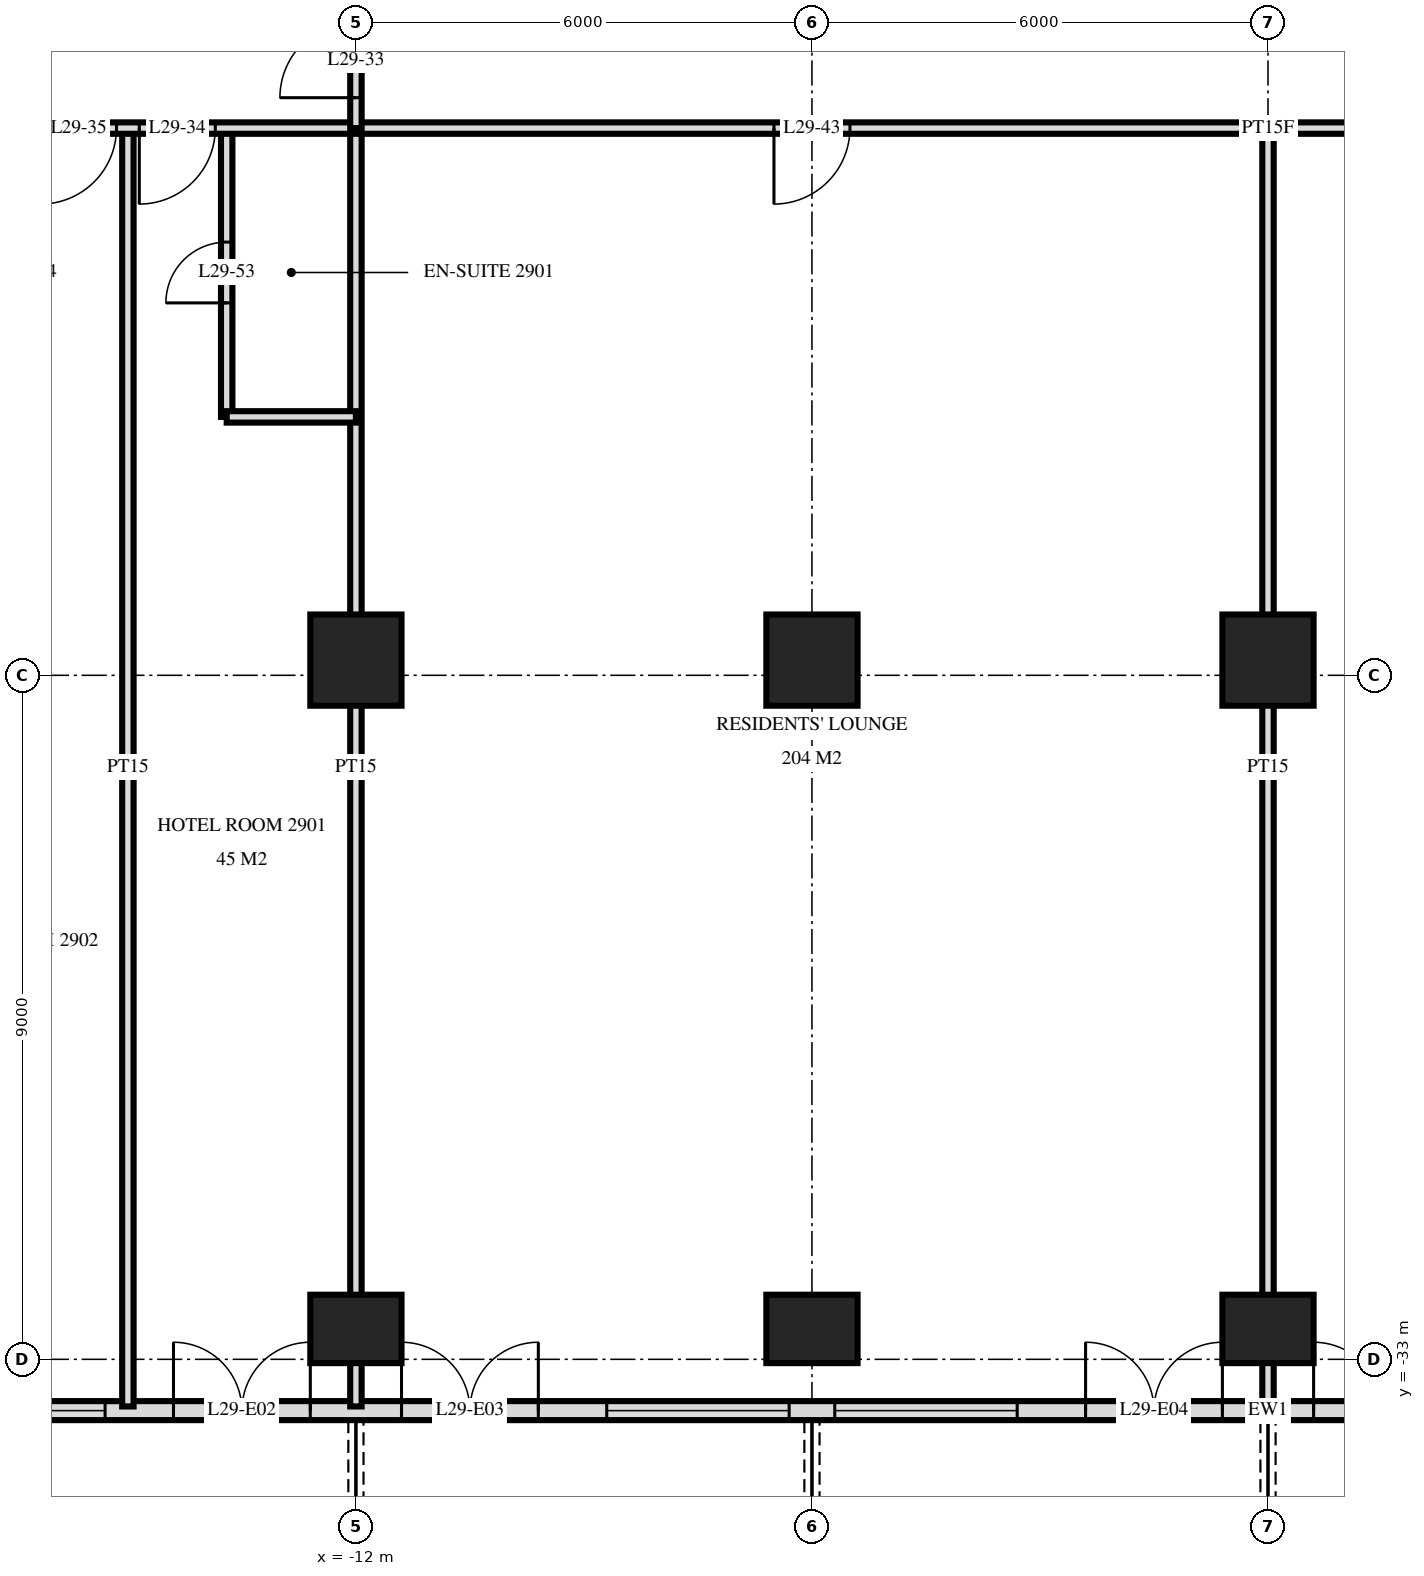
"""IFC4 building model, lengths in metres.
Left out: names, types, materials, properties, quantities, classifications, styles, units other than length and angle.
Written with IfcOpenShell. Run it as: python <this file> out.ifc"""

import sys

from ifc_helpers import new_model, si_unit, direction, frame, frame_2d, origin, origin_2d, place, context, subcontext, project, spatial, rectangle, extrude, element, fill, save


model = new_model("IFC4")
c1 = context("Model", 3, precision=1e-05, world=origin(), true_north=direction((0.0, 1.0)))
c2 = subcontext(c1, "Body", "Model", "MODEL_VIEW")
j1 = project(units=[si_unit("LENGTHUNIT", "METRE"), si_unit("PLANEANGLEUNIT", "RADIAN")], contexts=[c1])
p1 = place(None, origin())
s1 = spatial("IfcSite", under=j1, at=p1, CompositionType="ELEMENT")
p2 = place(p1, origin())
s2 = spatial("IfcBuilding", under=s1, at=p2, CompositionType="ELEMENT")
p3 = place(p2, frame((0.0, 0.0, 116.4)))
s3 = spatial("IfcBuildingStorey", under=s2, at=p3, CompositionType="ELEMENT", Elevation=116.4)
p4 = place(p3, frame((-12.0, -32.6, 0.0), z_axis=(0.0, 0.0, 1.0), x_axis=(1.0, 0.0, 0.0)))
e1 = element("IfcColumn", 1, at=p4, inside=s3, PredefinedType="COLUMN", context=c2, shape_type="SweptSolid", body=[
    extrude(rectangle(XDim=1.2, YDim=0.9, at=origin_2d()), origin(), (0.0, 0.0, 1.0), 3.6),
])
p5 = place(p3, frame((-12.0, -23.8, 0.0), z_axis=(0.0, 0.0, 1.0), x_axis=(1.0, 0.0, 0.0)))
e2 = element("IfcColumn", 2, at=p5, inside=s3, PredefinedType="COLUMN", context=c2, shape_type="SweptSolid", body=[
    extrude(rectangle(XDim=1.2, YDim=1.2, at=origin_2d()), origin(), (0.0, 0.0, 1.0), 3.6),
])
p6 = place(p3, frame((-6.0, -32.6, 0.0), z_axis=(0.0, 0.0, 1.0), x_axis=(1.0, 0.0, 0.0)))
e3 = element("IfcColumn", 3, at=p6, inside=s3, PredefinedType="COLUMN", context=c2, shape_type="SweptSolid", body=[
    extrude(rectangle(XDim=1.2, YDim=0.9, at=origin_2d()), origin(), (0.0, 0.0, 1.0), 3.6),
])
p7 = place(p3, frame((-6.0, -23.8, 0.0), z_axis=(0.0, 0.0, 1.0), x_axis=(1.0, 0.0, 0.0)))
e4 = element("IfcColumn", 4, at=p7, inside=s3, PredefinedType="COLUMN", context=c2, shape_type="SweptSolid", body=[
    extrude(rectangle(XDim=1.2, YDim=1.2, at=origin_2d()), origin(), (0.0, 0.0, 1.0), 3.6),
])
p8 = place(p3, frame((0.0, -32.6, 0.0), z_axis=(0.0, 0.0, 1.0), x_axis=(1.0, 0.0, 0.0)))
e5 = element("IfcColumn", 5, at=p8, inside=s3, PredefinedType="COLUMN", context=c2, shape_type="SweptSolid", body=[
    extrude(rectangle(XDim=1.2, YDim=0.9, at=origin_2d()), origin(), (0.0, 0.0, 1.0), 3.6),
])
p9 = place(p3, frame((0.0, -23.8, 0.0), z_axis=(0.0, 0.0, 1.0), x_axis=(1.0, 0.0, 0.0)))
e6 = element("IfcColumn", 6, at=p9, inside=s3, PredefinedType="COLUMN", context=c2, shape_type="SweptSolid", body=[
    extrude(rectangle(XDim=1.2, YDim=1.2, at=origin_2d()), origin(), (0.0, 0.0, 1.0), 3.6),
])
p10 = place(p3, frame((-23.675, -33.675, 0.0), z_axis=(0.0, 0.0, 1.0), x_axis=(1.0, 0.0, 0.0)))
e7 = element("IfcWall", 7, at=p10, inside=s3, PredefinedType="SOLIDWALL", context=c2, shape_type="SweptSolid", body=[
    extrude(rectangle(XDim=47.351, YDim=0.25, at=frame_2d((23.675, 0.0))), origin(), (0.0, 0.0, 1.0), 3.32),
])
p11 = place(p10, frame((0.275, 0.0, 0.3)))
e8 = element("IfcOpeningElement", 8, at=p11, cuts=e7, PredefinedType="OPENING", context=c2, shape_type="SweptSolid", body=[
    extrude(rectangle(XDim=2.4, YDim=2.1, at=frame_2d((1.2, 1.05))), frame((0.0, 0.135, 0.0), z_axis=(0.0, -1.0, 0.0), x_axis=(1.0, 0.0, 0.0)), (0.0, 0.0, 1.0), 0.27),
])
p12 = place(p10, frame((3.425, 0.0, 0.0)))
e9 = element("IfcOpeningElement", 9, at=p12, cuts=e7, PredefinedType="OPENING", context=c2, shape_type="SweptSolid", body=[
    extrude(rectangle(XDim=1.8, YDim=2.4, at=frame_2d((0.9, 1.2))), frame((0.0, 0.135, 0.0), z_axis=(0.0, -1.0, 0.0), x_axis=(1.0, 0.0, 0.0)), (0.0, 0.0, 1.0), 0.27),
])
p13 = place(p10, frame((5.975, 0.0, 0.3)))
e10 = element("IfcOpeningElement", 10, at=p13, cuts=e7, PredefinedType="OPENING", context=c2, shape_type="SweptSolid", body=[
    extrude(rectangle(XDim=2.4, YDim=2.1, at=frame_2d((1.2, 1.05))), frame((0.0, 0.135, 0.0), z_axis=(0.0, -1.0, 0.0), x_axis=(1.0, 0.0, 0.0)), (0.0, 0.0, 1.0), 0.27),
])
p14 = place(p10, frame((9.275, 0.0, 0.0)))
e11 = element("IfcOpeningElement", 11, at=p14, cuts=e7, PredefinedType="OPENING", context=c2, shape_type="SweptSolid", body=[
    extrude(rectangle(XDim=1.8, YDim=2.4, at=frame_2d((0.9, 1.2))), frame((0.0, 0.135, 0.0), z_axis=(0.0, -1.0, 0.0), x_axis=(1.0, 0.0, 0.0)), (0.0, 0.0, 1.0), 0.27),
])
p15 = place(p10, frame((12.275, 0.0, 0.0)))
e12 = element("IfcOpeningElement", 12, at=p15, cuts=e7, PredefinedType="OPENING", context=c2, shape_type="SweptSolid", body=[
    extrude(rectangle(XDim=1.8, YDim=2.4, at=frame_2d((0.9, 1.2))), frame((0.0, 0.135, 0.0), z_axis=(0.0, -1.0, 0.0), x_axis=(1.0, 0.0, 0.0)), (0.0, 0.0, 1.0), 0.27),
])
p16 = place(p10, frame((14.975, 0.0, 0.3)))
e13 = element("IfcOpeningElement", 13, at=p16, cuts=e7, PredefinedType="OPENING", context=c2, shape_type="SweptSolid", body=[
    extrude(rectangle(XDim=2.4, YDim=2.1, at=frame_2d((1.2, 1.05))), frame((0.0, 0.135, 0.0), z_axis=(0.0, -1.0, 0.0), x_axis=(1.0, 0.0, 0.0)), (0.0, 0.0, 1.0), 0.27),
])
p17 = place(p10, frame((17.975, 0.0, 0.3)))
e14 = element("IfcOpeningElement", 14, at=p17, cuts=e7, PredefinedType="OPENING", context=c2, shape_type="SweptSolid", body=[
    extrude(rectangle(XDim=2.4, YDim=2.1, at=frame_2d((1.2, 1.05))), frame((0.0, 0.135, 0.0), z_axis=(0.0, -1.0, 0.0), x_axis=(1.0, 0.0, 0.0)), (0.0, 0.0, 1.0), 0.27),
])
p18 = place(p10, frame((21.275, 0.0, 0.0)))
e15 = element("IfcOpeningElement", 15, at=p18, cuts=e7, PredefinedType="OPENING", context=c2, shape_type="SweptSolid", body=[
    extrude(rectangle(XDim=1.8, YDim=2.4, at=frame_2d((0.9, 1.2))), frame((0.0, 0.135, 0.0), z_axis=(0.0, -1.0, 0.0), x_axis=(1.0, 0.0, 0.0)), (0.0, 0.0, 1.0), 0.27),
])
p19 = place(p10, frame((24.275, 0.0, 0.0)))
e16 = element("IfcOpeningElement", 16, at=p19, cuts=e7, PredefinedType="OPENING", context=c2, shape_type="SweptSolid", body=[
    extrude(rectangle(XDim=1.8, YDim=2.4, at=frame_2d((0.9, 1.2))), frame((0.0, 0.135, 0.0), z_axis=(0.0, -1.0, 0.0), x_axis=(1.0, 0.0, 0.0)), (0.0, 0.0, 1.0), 0.27),
])
p20 = place(p10, frame((26.975, 0.0, 0.3)))
e17 = element("IfcOpeningElement", 17, at=p20, cuts=e7, PredefinedType="OPENING", context=c2, shape_type="SweptSolid", body=[
    extrude(rectangle(XDim=2.4, YDim=2.1, at=frame_2d((1.2, 1.05))), frame((0.0, 0.135, 0.0), z_axis=(0.0, -1.0, 0.0), x_axis=(1.0, 0.0, 0.0)), (0.0, 0.0, 1.0), 0.27),
])
p21 = place(p10, frame((30.275, 0.0, 0.0)))
e18 = element("IfcOpeningElement", 18, at=p21, cuts=e7, PredefinedType="OPENING", context=c2, shape_type="SweptSolid", body=[
    extrude(rectangle(XDim=1.8, YDim=2.4, at=frame_2d((0.9, 1.2))), frame((0.0, 0.135, 0.0), z_axis=(0.0, -1.0, 0.0), x_axis=(1.0, 0.0, 0.0)), (0.0, 0.0, 1.0), 0.27),
])
p22 = place(p10, frame((32.975, 0.0, 0.3)))
e19 = element("IfcOpeningElement", 19, at=p22, cuts=e7, PredefinedType="OPENING", context=c2, shape_type="SweptSolid", body=[
    extrude(rectangle(XDim=2.4, YDim=2.1, at=frame_2d((1.2, 1.05))), frame((0.0, 0.135, 0.0), z_axis=(0.0, -1.0, 0.0), x_axis=(1.0, 0.0, 0.0)), (0.0, 0.0, 1.0), 0.27),
])
p23 = place(p10, frame((35.975, 0.0, 0.3)))
e20 = element("IfcOpeningElement", 20, at=p23, cuts=e7, PredefinedType="OPENING", context=c2, shape_type="SweptSolid", body=[
    extrude(rectangle(XDim=2.4, YDim=2.1, at=frame_2d((1.2, 1.05))), frame((0.0, 0.135, 0.0), z_axis=(0.0, -1.0, 0.0), x_axis=(1.0, 0.0, 0.0)), (0.0, 0.0, 1.0), 0.27),
])
p24 = place(p10, frame((39.275, 0.0, 0.0)))
e21 = element("IfcOpeningElement", 21, at=p24, cuts=e7, PredefinedType="OPENING", context=c2, shape_type="SweptSolid", body=[
    extrude(rectangle(XDim=1.8, YDim=2.4, at=frame_2d((0.9, 1.2))), frame((0.0, 0.135, 0.0), z_axis=(0.0, -1.0, 0.0), x_axis=(1.0, 0.0, 0.0)), (0.0, 0.0, 1.0), 0.27),
])
p25 = place(p10, frame((41.975, 0.0, 0.3)))
e22 = element("IfcOpeningElement", 22, at=p25, cuts=e7, PredefinedType="OPENING", context=c2, shape_type="SweptSolid", body=[
    extrude(rectangle(XDim=2.4, YDim=2.1, at=frame_2d((1.2, 1.05))), frame((0.0, 0.135, 0.0), z_axis=(0.0, -1.0, 0.0), x_axis=(1.0, 0.0, 0.0)), (0.0, 0.0, 1.0), 0.27),
])
p26 = place(p10, frame((45.125, 0.0, 0.0)))
e23 = element("IfcOpeningElement", 23, at=p26, cuts=e7, PredefinedType="OPENING", context=c2, shape_type="SweptSolid", body=[
    extrude(rectangle(XDim=1.8, YDim=2.4, at=frame_2d((0.9, 1.2))), frame((0.0, 0.135, 0.0), z_axis=(0.0, -1.0, 0.0), x_axis=(1.0, 0.0, 0.0)), (0.0, 0.0, 1.0), 0.27),
])
p27 = place(p3, frame((0.0, -33.62, 0.0), z_axis=(0.0, 0.0, 1.0), x_axis=(0.0, 1.0, 0.0)))
e24 = element("IfcWall", 24, at=p27, inside=s3, PredefinedType="PARTITIONING", context=c2, shape_type="SweptSolid", body=[
    extrude(rectangle(XDim=16.82, YDim=0.15, at=frame_2d((8.41, 0.0))), origin(), (0.0, 0.0, 1.0), 3.32),
])
p28 = place(p3, frame((-12.0, -16.8, 0.0), z_axis=(0.0, 0.0, 1.0), x_axis=(0.0, 1.0, 0.0)))
e25 = element("IfcWall", 25, at=p28, inside=s3, PredefinedType="PARTITIONING", context=c2, shape_type="SweptSolid", body=[
    extrude(rectangle(XDim=1.75, YDim=0.15, at=frame_2d((0.875, 0.0))), origin(), (0.0, 0.0, 1.0), 3.32),
])
p29 = place(p28, frame((0.4, 0.0, 0.0)))
e26 = element("IfcOpeningElement", 26, at=p29, cuts=e25, PredefinedType="OPENING", context=c2, shape_type="SweptSolid", body=[
    extrude(rectangle(XDim=1.0, YDim=2.1, at=frame_2d((0.5, 1.05))), frame((0.0, 0.085, 0.0), z_axis=(0.0, -1.0, 0.0), x_axis=(1.0, 0.0, 0.0)), (0.0, 0.0, 1.0), 0.17),
])
p30 = place(p3, frame((-12.0, -33.62, 0.0), z_axis=(0.0, 0.0, 1.0), x_axis=(0.0, 1.0, 0.0)))
e27 = element("IfcWall", 27, at=p30, inside=s3, PredefinedType="PARTITIONING", context=c2, shape_type="SweptSolid", body=[
    extrude(rectangle(XDim=16.82, YDim=0.15, at=frame_2d((8.41, 0.0))), origin(), (0.0, 0.0, 1.0), 3.32),
])
p31 = place(p3, frame((-13.7, -20.6, 0.0), z_axis=(0.0, 0.0, 1.0), x_axis=(0.0, 1.0, 0.0)))
e28 = element("IfcWall", 28, at=p31, inside=s3, PredefinedType="PARTITIONING", context=c2, shape_type="SweptSolid", body=[
    extrude(rectangle(XDim=3.8, YDim=0.15, at=frame_2d((1.9, 0.0))), origin(), (0.0, 0.0, 1.0), 3.32),
])
p32 = place(p31, frame((1.5, 0.0, 0.0)))
e29 = element("IfcOpeningElement", 29, at=p32, cuts=e28, PredefinedType="OPENING", context=c2, shape_type="SweptSolid", body=[
    extrude(rectangle(XDim=0.8, YDim=2.1, at=frame_2d((0.4, 1.05))), frame((0.0, 0.085, 0.0), z_axis=(0.0, -1.0, 0.0), x_axis=(1.0, 0.0, 0.0)), (0.0, 0.0, 1.0), 0.17),
])
p33 = place(p3, frame((-15.0, -33.62, 0.0), z_axis=(0.0, 0.0, 1.0), x_axis=(0.0, 1.0, 0.0)))
e30 = element("IfcWall", 30, at=p33, inside=s3, PredefinedType="PARTITIONING", context=c2, shape_type="SweptSolid", body=[
    extrude(rectangle(XDim=16.82, YDim=0.15, at=frame_2d((8.41, 0.0))), origin(), (0.0, 0.0, 1.0), 3.32),
])
p34 = place(p3, frame((-13.7, -20.6, 0.0), z_axis=(0.0, 0.0, 1.0), x_axis=(1.0, 0.0, 0.0)))
e31 = element("IfcWall", 31, at=p34, inside=s3, PredefinedType="PARTITIONING", context=c2, shape_type="SweptSolid", body=[
    extrude(rectangle(XDim=1.7, YDim=0.15, at=frame_2d((0.85, 0.0))), origin(), (0.0, 0.0, 1.0), 3.32),
])
p35 = place(p3, frame((-28.02, -16.8, 0.0), z_axis=(0.0, 0.0, 1.0), x_axis=(1.0, 0.0, 0.0)))
e32 = element("IfcWall", 32, at=p35, inside=s3, PredefinedType="PARTITIONING", context=c2, shape_type="SweptSolid", body=[
    extrude(rectangle(XDim=56.04, YDim=0.15, at=frame_2d((28.02, 0.0))), origin(), (0.0, 0.0, 1.0), 3.32),
])
p36 = place(p35, frame((13.17, 0.0, 0.0)))
e33 = element("IfcOpeningElement", 33, at=p36, cuts=e32, PredefinedType="OPENING", context=c2, shape_type="SweptSolid", body=[
    extrude(rectangle(XDim=1.0, YDim=2.1, at=frame_2d((0.5, 1.05))), frame((0.0, 0.085, 0.0), z_axis=(0.0, -1.0, 0.0), x_axis=(1.0, 0.0, 0.0)), (0.0, 0.0, 1.0), 0.17),
])
p37 = place(p35, frame((11.87, 0.0, 0.0)))
e34 = element("IfcOpeningElement", 34, at=p37, cuts=e32, PredefinedType="OPENING", context=c2, shape_type="SweptSolid", body=[
    extrude(rectangle(XDim=1.0, YDim=2.1, at=frame_2d((0.5, 1.05))), frame((0.0, 0.085, 0.0), z_axis=(0.0, -1.0, 0.0), x_axis=(1.0, 0.0, 0.0)), (0.0, 0.0, 1.0), 0.17),
])
p38 = place(p35, frame((8.32, 0.0, 0.0)))
e35 = element("IfcOpeningElement", 35, at=p38, cuts=e32, PredefinedType="OPENING", context=c2, shape_type="SweptSolid", body=[
    extrude(rectangle(XDim=1.0, YDim=2.1, at=frame_2d((0.5, 1.05))), frame((0.0, 0.085, 0.0), z_axis=(0.0, -1.0, 0.0), x_axis=(1.0, 0.0, 0.0)), (0.0, 0.0, 1.0), 0.17),
])
p39 = place(p35, frame((40.42, 0.0, 0.0)))
e36 = element("IfcOpeningElement", 36, at=p39, cuts=e32, PredefinedType="OPENING", context=c2, shape_type="SweptSolid", body=[
    extrude(rectangle(XDim=1.0, YDim=2.1, at=frame_2d((0.5, 1.05))), frame((0.0, 0.085, 0.0), z_axis=(0.0, -1.0, 0.0), x_axis=(1.0, 0.0, 0.0)), (0.0, 0.0, 1.0), 0.17),
])
p40 = place(p35, frame((46.72, 0.0, 0.0)))
e37 = element("IfcOpeningElement", 37, at=p40, cuts=e32, PredefinedType="OPENING", context=c2, shape_type="SweptSolid", body=[
    extrude(rectangle(XDim=1.0, YDim=2.1, at=frame_2d((0.5, 1.05))), frame((0.0, 0.085, 0.0), z_axis=(0.0, -1.0, 0.0), x_axis=(1.0, 0.0, 0.0)), (0.0, 0.0, 1.0), 0.17),
])
p41 = place(p35, frame((21.52, 0.0, 0.0)))
e38 = element("IfcOpeningElement", 38, at=p41, cuts=e32, PredefinedType="OPENING", context=c2, shape_type="SweptSolid", body=[
    extrude(rectangle(XDim=1.0, YDim=2.1, at=frame_2d((0.5, 1.05))), frame((0.0, 0.085, 0.0), z_axis=(0.0, -1.0, 0.0), x_axis=(1.0, 0.0, 0.0)), (0.0, 0.0, 1.0), 0.17),
])
p42 = place(p35, frame((30.52, 0.0, 0.0)))
e39 = element("IfcOpeningElement", 39, at=p42, cuts=e32, PredefinedType="OPENING", context=c2, shape_type="SweptSolid", body=[
    extrude(rectangle(XDim=1.0, YDim=2.1, at=frame_2d((0.5, 1.05))), frame((0.0, 0.085, 0.0), z_axis=(0.0, -1.0, 0.0), x_axis=(1.0, 0.0, 0.0)), (0.0, 0.0, 1.0), 0.17),
])
p43 = place(p35, frame((36.52, 0.0, 0.0)))
e40 = element("IfcOpeningElement", 40, at=p43, cuts=e32, PredefinedType="OPENING", context=c2, shape_type="SweptSolid", body=[
    extrude(rectangle(XDim=1.0, YDim=2.1, at=frame_2d((0.5, 1.05))), frame((0.0, 0.085, 0.0), z_axis=(0.0, -1.0, 0.0), x_axis=(1.0, 0.0, 0.0)), (0.0, 0.0, 1.0), 0.17),
])
p44 = place(p13, origin())
e41 = element("IfcWindow", 41, at=p44, inside=s3, PartitioningType="SINGLE_PANEL", PredefinedType="WINDOW", context=c2, shape_type="SweptSolid", body=[
    extrude(rectangle(XDim=2.4, YDim=2.1, at=frame_2d((1.2, 1.05))), frame((0.0, 0.03, 0.0), z_axis=(0.0, -1.0, 0.0), x_axis=(1.0, 0.0, 0.0)), (0.0, 0.0, 1.0), 0.06),
])
fill(e10, e41)
p45 = place(p14, origin())
e42 = element("IfcDoor", 42, at=p45, inside=s3, OperationType="DOUBLE_DOOR_SINGLE_SWING", PredefinedType="DOOR", context=c2, shape_type="SweptSolid", body=[
    extrude(rectangle(XDim=1.8, YDim=2.4, at=frame_2d((0.9, 1.2))), frame((0.0, 0.025, 0.0), z_axis=(0.0, -1.0, 0.0), x_axis=(1.0, 0.0, 0.0)), (0.0, 0.0, 1.0), 0.05),
])
fill(e11, e42)
p46 = place(p15, origin())
e43 = element("IfcDoor", 43, at=p46, inside=s3, OperationType="DOUBLE_DOOR_SINGLE_SWING", PredefinedType="DOOR", context=c2, shape_type="SweptSolid", body=[
    extrude(rectangle(XDim=1.8, YDim=2.4, at=frame_2d((0.9, 1.2))), frame((0.0, 0.025, 0.0), z_axis=(0.0, -1.0, 0.0), x_axis=(1.0, 0.0, 0.0)), (0.0, 0.0, 1.0), 0.05),
])
fill(e12, e43)
p47 = place(p16, origin())
e44 = element("IfcWindow", 44, at=p47, inside=s3, PartitioningType="SINGLE_PANEL", PredefinedType="WINDOW", context=c2, shape_type="SweptSolid", body=[
    extrude(rectangle(XDim=2.4, YDim=2.1, at=frame_2d((1.2, 1.05))), frame((0.0, 0.03, 0.0), z_axis=(0.0, -1.0, 0.0), x_axis=(1.0, 0.0, 0.0)), (0.0, 0.0, 1.0), 0.06),
])
fill(e13, e44)
p48 = place(p17, origin())
e45 = element("IfcWindow", 45, at=p48, inside=s3, PartitioningType="SINGLE_PANEL", PredefinedType="WINDOW", context=c2, shape_type="SweptSolid", body=[
    extrude(rectangle(XDim=2.4, YDim=2.1, at=frame_2d((1.2, 1.05))), frame((0.0, 0.03, 0.0), z_axis=(0.0, -1.0, 0.0), x_axis=(1.0, 0.0, 0.0)), (0.0, 0.0, 1.0), 0.06),
])
fill(e14, e45)
p49 = place(p18, origin())
e46 = element("IfcDoor", 46, at=p49, inside=s3, OperationType="DOUBLE_DOOR_SINGLE_SWING", PredefinedType="DOOR", context=c2, shape_type="SweptSolid", body=[
    extrude(rectangle(XDim=1.8, YDim=2.4, at=frame_2d((0.9, 1.2))), frame((0.0, 0.025, 0.0), z_axis=(0.0, -1.0, 0.0), x_axis=(1.0, 0.0, 0.0)), (0.0, 0.0, 1.0), 0.05),
])
fill(e15, e46)
p50 = place(p19, origin())
e47 = element("IfcDoor", 47, at=p50, inside=s3, OperationType="DOUBLE_DOOR_SINGLE_SWING", PredefinedType="DOOR", context=c2, shape_type="SweptSolid", body=[
    extrude(rectangle(XDim=1.8, YDim=2.4, at=frame_2d((0.9, 1.2))), frame((0.0, 0.025, 0.0), z_axis=(0.0, -1.0, 0.0), x_axis=(1.0, 0.0, 0.0)), (0.0, 0.0, 1.0), 0.05),
])
fill(e16, e47)
p51 = place(p29, origin())
e48 = element("IfcDoor", 48, at=p51, inside=s3, OperationType="SINGLE_SWING_RIGHT", PredefinedType="DOOR", context=c2, shape_type="SweptSolid", body=[
    extrude(rectangle(XDim=1.0, YDim=2.1, at=frame_2d((0.5, 1.05))), frame((0.0, 0.025, 0.0), z_axis=(0.0, -1.0, 0.0), x_axis=(1.0, 0.0, 0.0)), (0.0, 0.0, 1.0), 0.05),
])
fill(e26, e48)
p52 = place(p36, frame((0.5, 0.0, 0.0), z_axis=(0.0, 0.0, 1.0), x_axis=(-1.0, 0.0, 0.0)))
e49 = element("IfcDoor", 49, at=p52, inside=s3, OperationType="SINGLE_SWING_LEFT", PredefinedType="DOOR", context=c2, shape_type="SweptSolid", body=[
    extrude(rectangle(XDim=1.0, YDim=2.1, at=frame_2d((0.0, 1.05))), frame((0.0, -0.025, 0.0), z_axis=(0.0, 1.0, 0.0), x_axis=(-1.0, 0.0, 0.0)), (0.0, 0.0, 1.0), 0.05),
])
fill(e33, e49)
p53 = place(p37, frame((0.5, 0.0, 0.0), z_axis=(0.0, 0.0, 1.0), x_axis=(-1.0, 0.0, 0.0)))
e50 = element("IfcDoor", 50, at=p53, inside=s3, OperationType="SINGLE_SWING_LEFT", PredefinedType="DOOR", context=c2, shape_type="SweptSolid", body=[
    extrude(rectangle(XDim=1.0, YDim=2.1, at=frame_2d((0.0, 1.05))), frame((0.0, -0.025, 0.0), z_axis=(0.0, 1.0, 0.0), x_axis=(-1.0, 0.0, 0.0)), (0.0, 0.0, 1.0), 0.05),
])
fill(e34, e50)
p54 = place(p41, frame((0.5, 0.0, 0.0), z_axis=(0.0, 0.0, 1.0), x_axis=(-1.0, 0.0, 0.0)))
e51 = element("IfcDoor", 51, at=p54, inside=s3, OperationType="SINGLE_SWING_LEFT", PredefinedType="DOOR", context=c2, shape_type="SweptSolid", body=[
    extrude(rectangle(XDim=1.0, YDim=2.1, at=frame_2d((0.0, 1.05))), frame((0.0, -0.025, 0.0), z_axis=(0.0, 1.0, 0.0), x_axis=(-1.0, 0.0, 0.0)), (0.0, 0.0, 1.0), 0.05),
])
fill(e38, e51)
p55 = place(p32, origin())
e52 = element("IfcDoor", 52, at=p55, inside=s3, OperationType="SINGLE_SWING_RIGHT", PredefinedType="DOOR", context=c2, shape_type="SweptSolid", body=[
    extrude(rectangle(XDim=0.8, YDim=2.1, at=frame_2d((0.4, 1.05))), frame((0.0, 0.025, 0.0), z_axis=(0.0, -1.0, 0.0), x_axis=(1.0, 0.0, 0.0)), (0.0, 0.0, 1.0), 0.05),
])
fill(e29, e52)
save(model, sys.argv[1])
